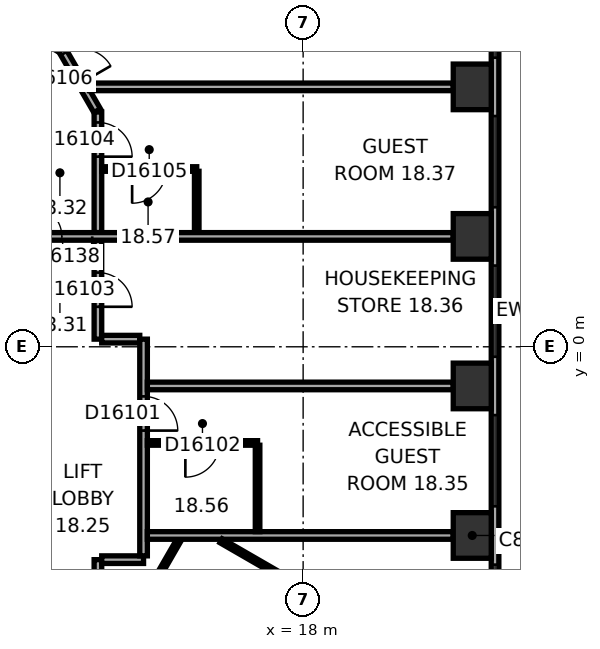
"""IFC4 building model, lengths in metres.
Left out: names, types, materials, properties, quantities, classifications, styles, units other than length and angle.
Written with IfcOpenShell. Run it as: python <this file> out.ifc"""

import sys

from ifc_helpers import new_model, si_unit, direction, frame, frame_2d, origin, origin_2d, place, context, subcontext, project, spatial, rectangle, extrude, element, fill, save


model = new_model("IFC4")
c1 = context("Model", 3, precision=1e-05, world=origin(), true_north=direction((0.0, 1.0)))
c2 = subcontext(c1, "Body", "Model", "MODEL_VIEW")
j1 = project(units=[si_unit("LENGTHUNIT", "METRE"), si_unit("PLANEANGLEUNIT", "RADIAN")], contexts=[c1])
p1 = place(None, origin())
s1 = spatial("IfcSite", under=j1, at=p1, CompositionType="ELEMENT")
p2 = place(p1, origin())
s2 = spatial("IfcBuilding", under=s1, at=p2, CompositionType="ELEMENT")
p3 = place(p2, frame((0.0, 0.0, 83.6)))
s3 = spatial("IfcBuildingStorey", under=s2, at=p3, CompositionType="ELEMENT", Elevation=83.6)
for number, where, z_axis, x_axis in (
    (1, (22.45, -4.965, 0.0), (0.0, 0.0, 1.0), (0.0, 1.0, 0.0)),
    (2, (22.45, -1.03, 0.0), (0.0, 0.0, 1.0), (0.0, 1.0, 0.0)),
    (3, (22.45, 2.905, 0.0), (0.0, 0.0, 1.0), (0.0, 1.0, 0.0)),
    (4, (22.45, 6.839, 0.0), (0.0, 0.0, 1.0), (0.0, 1.0, 0.0)),
):
    element("IfcColumn", number, at=place(p3, frame(where, z_axis=z_axis, x_axis=x_axis)), inside=s3, PredefinedType="COLUMN", context=c2, shape_type="SweptSolid", body=[
        extrude(rectangle(XDim=1.2, YDim=1.0, at=origin_2d()), origin(), (0.0, 0.0, 1.0), 3.3),
    ])
p4 = place(p3, frame((23.05, -9.687, 0.0), z_axis=(0.0, 0.0, 1.0), x_axis=(0.0, 1.0, 0.0)))
e5 = element("IfcWall", 5, at=p4, inside=s3, PredefinedType="STANDARD", context=c2, shape_type="SweptSolid", body=[
    extrude(rectangle(XDim=21.246, YDim=0.2, at=frame_2d((10.623, 0.0))), origin(), (0.0, 0.0, 1.0), 3.3),
])
p5 = place(p4, frame((1.555, 0.0, 0.8)))
e6 = element("IfcOpeningElement", 6, at=p5, cuts=e5, PredefinedType="OPENING", context=c2, shape_type="SweptSolid", body=[
    extrude(rectangle(XDim=2.4, YDim=1.7, at=frame_2d((1.2, 0.85))), frame((0.0, 0.11, 0.0), z_axis=(0.0, -1.0, 0.0), x_axis=(1.0, 0.0, 0.0)), (0.0, 0.0, 1.0), 0.22),
])
p6 = place(p4, frame((5.489, 0.0, 0.8)))
e7 = element("IfcOpeningElement", 7, at=p6, cuts=e5, PredefinedType="OPENING", context=c2, shape_type="SweptSolid", body=[
    extrude(rectangle(XDim=2.4, YDim=1.7, at=frame_2d((1.2, 0.85))), frame((0.0, 0.11, 0.0), z_axis=(0.0, -1.0, 0.0), x_axis=(1.0, 0.0, 0.0)), (0.0, 0.0, 1.0), 0.22),
])
p7 = place(p4, frame((9.424, 0.0, 0.8)))
e8 = element("IfcOpeningElement", 8, at=p7, cuts=e5, PredefinedType="OPENING", context=c2, shape_type="SweptSolid", body=[
    extrude(rectangle(XDim=2.4, YDim=1.7, at=frame_2d((1.2, 0.85))), frame((0.0, 0.11, 0.0), z_axis=(0.0, -1.0, 0.0), x_axis=(1.0, 0.0, 0.0)), (0.0, 0.0, 1.0), 0.22),
])
p8 = place(p4, frame((13.358, 0.0, 0.8)))
e9 = element("IfcOpeningElement", 9, at=p8, cuts=e5, PredefinedType="OPENING", context=c2, shape_type="SweptSolid", body=[
    extrude(rectangle(XDim=2.4, YDim=1.7, at=frame_2d((1.2, 0.85))), frame((0.0, 0.11, 0.0), z_axis=(0.0, -1.0, 0.0), x_axis=(1.0, 0.0, 0.0)), (0.0, 0.0, 1.0), 0.22),
])
p9 = place(p4, frame((17.293, 0.0, 0.8)))
e10 = element("IfcOpeningElement", 10, at=p9, cuts=e5, PredefinedType="OPENING", context=c2, shape_type="SweptSolid", body=[
    extrude(rectangle(XDim=2.4, YDim=1.7, at=frame_2d((1.2, 0.85))), frame((0.0, 0.11, 0.0), z_axis=(0.0, -1.0, 0.0), x_axis=(1.0, 0.0, 0.0)), (0.0, 0.0, 1.0), 0.22),
])
p10 = place(p3, frame((12.58, 6.212, 0.0), z_axis=(0.0, 0.0, 1.0), x_axis=(-0.500063286585, 0.865988862174, 0.0)))
e11 = element("IfcWall", 11, at=p10, inside=s3, PredefinedType="PARTITIONING", context=c2, shape_type="SweptSolid", body=[
    extrude(rectangle(XDim=1.86, YDim=0.2, at=frame_2d((0.93, 0.0))), origin(), (0.0, 0.0, 1.0), 3.05),
])
p11 = place(p10, frame((0.842, 0.0, 0.0)))
e12 = element("IfcOpeningElement", 12, at=p11, cuts=e11, PredefinedType="OPENING", context=c2, shape_type="SweptSolid", body=[
    extrude(rectangle(XDim=0.9, YDim=2.1, at=frame_2d((0.45, 1.05))), frame((0.0, 0.11, 0.0), z_axis=(0.0, -1.0, 0.0), x_axis=(1.0, 0.0, 0.0)), (0.0, 0.0, 1.0), 0.22),
])
p12 = place(p3, frame((12.6, -6.138, 0.0), z_axis=(0.0, 0.0, 1.0), x_axis=(0.0, 1.0, 0.0)))
e13 = element("IfcWall", 13, at=p12, inside=s3, PredefinedType="PARTITIONING", context=c2, shape_type="SweptSolid", body=[
    extrude(rectangle(XDim=0.537, YDim=0.2, at=frame_2d((0.268, 0.0))), origin(), (0.0, 0.0, 1.0), 3.05),
])
p13 = place(p3, frame((12.6, 0.201, 0.0), z_axis=(0.0, 0.0, 1.0), x_axis=(0.0, 1.0, 0.0)))
e14 = element("IfcWall", 14, at=p13, inside=s3, PredefinedType="PARTITIONING", context=c2, shape_type="SweptSolid", body=[
    extrude(rectangle(XDim=2.604, YDim=0.2, at=frame_2d((1.302, 0.0))), origin(), (0.0, 0.0, 1.0), 3.05),
])
p14 = place(p13, frame((0.852, 0.0, 0.0)))
e15 = element("IfcOpeningElement", 15, at=p14, cuts=e14, PredefinedType="OPENING", context=c2, shape_type="SweptSolid", body=[
    extrude(rectangle(XDim=0.9, YDim=2.1, at=frame_2d((0.45, 1.05))), frame((0.0, 0.11, 0.0), z_axis=(0.0, -1.0, 0.0), x_axis=(1.0, 0.0, 0.0)), (0.0, 0.0, 1.0), 0.22),
])
p15 = place(p3, frame((12.6, 3.004, 0.0), z_axis=(0.0, 0.0, 1.0), x_axis=(0.0, 1.0, 0.0)))
e16 = element("IfcWall", 16, at=p15, inside=s3, PredefinedType="PARTITIONING", context=c2, shape_type="SweptSolid", body=[
    extrude(rectangle(XDim=3.173, YDim=0.2, at=frame_2d((1.586, 0.0))), origin(), (0.0, 0.0, 1.0), 3.05),
])
p16 = place(p15, frame((1.998, 0.0, 0.0)))
e17 = element("IfcOpeningElement", 17, at=p16, cuts=e16, PredefinedType="OPENING", context=c2, shape_type="SweptSolid", body=[
    extrude(rectangle(XDim=0.9, YDim=2.1, at=frame_2d((0.45, 1.05))), frame((0.0, 0.11, 0.0), z_axis=(0.0, -1.0, 0.0), x_axis=(1.0, 0.0, 0.0)), (0.0, 0.0, 1.0), 0.22),
])
p17 = place(p3, frame((12.7, -5.601, 0.0), z_axis=(0.0, 0.0, 1.0), x_axis=(1.0, 0.0, 0.0)))
e18 = element("IfcWall", 18, at=p17, inside=s3, PredefinedType="PARTITIONING", context=c2, shape_type="SweptSolid", body=[
    extrude(rectangle(XDim=1.101, YDim=0.2, at=frame_2d((0.551, 0.0))), origin(), (0.0, 0.0, 1.0), 3.05),
])
p18 = place(p3, frame((12.7, 4.677, 0.0), z_axis=(0.0, 0.0, 1.0), x_axis=(1.0, 0.0, 0.0)))
e19 = element("IfcWall", 19, at=p18, inside=s3, PredefinedType="PARTITIONING", context=c2, shape_type="SweptSolid", body=[
    extrude(rectangle(XDim=2.5, YDim=0.12, at=frame_2d((1.25, 0.0))), origin(), (0.0, 0.0, 1.0), 3.05),
])
p19 = place(p18, frame((0.8, 0.0, 0.0)))
e20 = element("IfcOpeningElement", 20, at=p19, cuts=e19, PredefinedType="OPENING", context=c2, shape_type="SweptSolid", body=[
    extrude(rectangle(XDim=0.9, YDim=2.1, at=frame_2d((0.45, 1.05))), frame((0.0, 0.07, 0.0), z_axis=(0.0, -1.0, 0.0), x_axis=(1.0, 0.0, 0.0)), (0.0, 0.0, 1.0), 0.14),
])
p20 = place(p3, frame((13.701, 0.201, 0.0), z_axis=(0.0, 0.0, 1.0), x_axis=(-1.0, 0.0, 0.0)))
e21 = element("IfcWall", 21, at=p20, inside=s3, PredefinedType="PARTITIONING", context=c2, shape_type="SweptSolid", body=[
    extrude(rectangle(XDim=1.001, YDim=0.2, at=frame_2d((0.5, 0.0))), origin(), (0.0, 0.0, 1.0), 3.05),
])
p21 = place(p3, frame((13.801, -5.501, 0.0), z_axis=(0.0, 0.0, 1.0), x_axis=(0.0, 1.0, 0.0)))
e22 = element("IfcWall", 22, at=p21, inside=s3, PredefinedType="PARTITIONING", context=c2, shape_type="SweptSolid", body=[
    extrude(rectangle(XDim=5.702, YDim=0.2, at=frame_2d((2.851, 0.0))), origin(), (0.0, 0.0, 1.0), 3.05),
])
p22 = place(p21, frame((3.296, 0.0, 0.0)))
e23 = element("IfcOpeningElement", 23, at=p22, cuts=e22, PredefinedType="OPENING", context=c2, shape_type="SweptSolid", body=[
    extrude(rectangle(XDim=0.9, YDim=2.1, at=frame_2d((0.45, 1.05))), frame((0.0, 0.11, 0.0), z_axis=(0.0, -1.0, 0.0), x_axis=(1.0, 0.0, 0.0)), (0.0, 0.0, 1.0), 0.22),
])
p23 = place(p3, frame((13.901, -6.524, 0.0), z_axis=(0.0, 0.0, 1.0), x_axis=(0.499964162598, 0.86604609353, 0.0)))
e24 = element("IfcWall", 24, at=p23, inside=s3, PredefinedType="PARTITIONING", context=c2, shape_type="SweptSolid", body=[
    extrude(rectangle(XDim=1.661, YDim=0.12, at=frame_2d((0.831, 0.0))), origin(), (0.0, 0.0, 1.0), 3.05),
])
p24 = place(p3, frame((13.901, -4.965, 0.0), z_axis=(0.0, 0.0, 1.0), x_axis=(1.0, 0.0, 0.0)))
e25 = element("IfcWall", 25, at=p24, inside=s3, PredefinedType="PARTITIONING", context=c2, shape_type="SweptSolid", body=[
    extrude(rectangle(XDim=8.049, YDim=0.2, at=frame_2d((4.024, 0.0))), origin(), (0.0, 0.0, 1.0), 3.05),
])
p25 = place(p3, frame((13.901, -2.53, 0.0), z_axis=(0.0, 0.0, 1.0), x_axis=(1.0, 0.0, 0.0)))
e26 = element("IfcWall", 26, at=p25, inside=s3, PredefinedType="PARTITIONING", context=c2, shape_type="SweptSolid", body=[
    extrude(rectangle(XDim=2.9, YDim=0.12, at=frame_2d((1.45, 0.0))), origin(), (0.0, 0.0, 1.0), 3.05),
])
p26 = place(p25, frame((1.0, 0.0, 0.0)))
e27 = element("IfcOpeningElement", 27, at=p26, cuts=e26, PredefinedType="OPENING", context=c2, shape_type="SweptSolid", body=[
    extrude(rectangle(XDim=0.9, YDim=2.1, at=frame_2d((0.45, 1.05))), frame((0.0, 0.07, 0.0), z_axis=(0.0, -1.0, 0.0), x_axis=(1.0, 0.0, 0.0)), (0.0, 0.0, 1.0), 0.14),
])
p27 = place(p3, frame((15.2, 4.618, 0.0), z_axis=(0.0, 0.0, 1.0), x_axis=(0.0, -1.0, 0.0)))
e28 = element("IfcWall", 28, at=p27, inside=s3, PredefinedType="PARTITIONING", context=c2, shape_type="SweptSolid", body=[
    extrude(rectangle(XDim=1.613, YDim=0.12, at=frame_2d((0.807, 0.0))), origin(), (0.0, 0.0, 1.0), 3.05),
])
p28 = place(p3, frame((15.841, -5.104, 0.0), z_axis=(0.0, 0.0, 1.0), x_axis=(0.866025591402, -0.499999675036, 0.0)))
e29 = element("IfcWall", 29, at=p28, inside=s3, PredefinedType="PARTITIONING", context=c2, shape_type="SweptSolid", body=[
    extrude(rectangle(XDim=1.83, YDim=0.12, at=frame_2d((0.915, 0.0))), origin(), (0.0, 0.0, 1.0), 3.05),
])
p29 = place(p3, frame((16.801, -2.59, 0.0), z_axis=(0.0, 0.0, 1.0), x_axis=(0.0, -1.0, 0.0)))
e30 = element("IfcWall", 30, at=p29, inside=s3, PredefinedType="PARTITIONING", context=c2, shape_type="SweptSolid", body=[
    extrude(rectangle(XDim=2.274, YDim=0.12, at=frame_2d((1.137, 0.0))), origin(), (0.0, 0.0, 1.0), 3.05),
])
p30 = place(p3, frame((21.95, -1.03, 0.0), z_axis=(0.0, 0.0, 1.0), x_axis=(-1.0, 0.0, 0.0)))
e31 = element("IfcWall", 31, at=p30, inside=s3, PredefinedType="PARTITIONING", context=c2, shape_type="SweptSolid", body=[
    extrude(rectangle(XDim=8.049, YDim=0.2, at=frame_2d((4.024, 0.0))), origin(), (0.0, 0.0, 1.0), 2.6),
])
p31 = place(p3, frame((21.95, 2.905, 0.0), z_axis=(0.0, 0.0, 1.0), x_axis=(-1.0, 0.0, 0.0)))
e32 = element("IfcWall", 32, at=p31, inside=s3, PredefinedType="PARTITIONING", context=c2, shape_type="SweptSolid", body=[
    extrude(rectangle(XDim=11.25, YDim=0.2, at=frame_2d((5.625, 0.0))), origin(), (0.0, 0.0, 1.0), 3.05),
])
p32 = place(p31, frame((9.5, 0.0, 0.0)))
e33 = element("IfcOpeningElement", 33, at=p32, cuts=e32, PredefinedType="OPENING", context=c2, shape_type="SweptSolid", body=[
    extrude(rectangle(XDim=1.6, YDim=2.1, at=frame_2d((0.8, 1.05))), frame((0.0, 0.11, 0.0), z_axis=(0.0, -1.0, 0.0), x_axis=(1.0, 0.0, 0.0)), (0.0, 0.0, 1.0), 0.22),
])
p33 = place(p3, frame((21.95, 6.839, 0.0), z_axis=(0.0, 0.0, 1.0), x_axis=(-1.0, 0.0, 0.0)))
e34 = element("IfcWall", 34, at=p33, inside=s3, PredefinedType="PARTITIONING", context=c2, shape_type="SweptSolid", body=[
    extrude(rectangle(XDim=9.572, YDim=0.2, at=frame_2d((4.786, 0.0))), origin(), (0.0, 0.0, 1.0), 3.05),
])
p34 = place(p5, origin())
e35 = element("IfcWindow", 35, at=p34, inside=s3, PartitioningType="SINGLE_PANEL", PredefinedType="WINDOW", context=c2, shape_type="SweptSolid", body=[
    extrude(rectangle(XDim=2.4, YDim=1.7, at=frame_2d((1.2, 0.85))), frame((0.0, 0.03, 0.0), z_axis=(0.0, -1.0, 0.0), x_axis=(1.0, 0.0, 0.0)), (0.0, 0.0, 1.0), 0.06),
])
fill(e6, e35)
p35 = place(p6, origin())
e36 = element("IfcWindow", 36, at=p35, inside=s3, PartitioningType="SINGLE_PANEL", PredefinedType="WINDOW", context=c2, shape_type="SweptSolid", body=[
    extrude(rectangle(XDim=2.4, YDim=1.7, at=frame_2d((1.2, 0.85))), frame((0.0, 0.03, 0.0), z_axis=(0.0, -1.0, 0.0), x_axis=(1.0, 0.0, 0.0)), (0.0, 0.0, 1.0), 0.06),
])
fill(e7, e36)
p36 = place(p7, origin())
e37 = element("IfcWindow", 37, at=p36, inside=s3, PartitioningType="SINGLE_PANEL", PredefinedType="WINDOW", context=c2, shape_type="SweptSolid", body=[
    extrude(rectangle(XDim=2.4, YDim=1.7, at=frame_2d((1.2, 0.85))), frame((0.0, 0.03, 0.0), z_axis=(0.0, -1.0, 0.0), x_axis=(1.0, 0.0, 0.0)), (0.0, 0.0, 1.0), 0.06),
])
fill(e8, e37)
p37 = place(p8, origin())
e38 = element("IfcWindow", 38, at=p37, inside=s3, PartitioningType="SINGLE_PANEL", PredefinedType="WINDOW", context=c2, shape_type="SweptSolid", body=[
    extrude(rectangle(XDim=2.4, YDim=1.7, at=frame_2d((1.2, 0.85))), frame((0.0, 0.03, 0.0), z_axis=(0.0, -1.0, 0.0), x_axis=(1.0, 0.0, 0.0)), (0.0, 0.0, 1.0), 0.06),
])
fill(e9, e38)
p38 = place(p9, origin())
e39 = element("IfcWindow", 39, at=p38, inside=s3, PartitioningType="SINGLE_PANEL", PredefinedType="WINDOW", context=c2, shape_type="SweptSolid", body=[
    extrude(rectangle(XDim=2.4, YDim=1.7, at=frame_2d((1.2, 0.85))), frame((0.0, 0.03, 0.0), z_axis=(0.0, -1.0, 0.0), x_axis=(1.0, 0.0, 0.0)), (0.0, 0.0, 1.0), 0.06),
])
fill(e10, e39)
p39 = place(p22, origin())
e40 = element("IfcDoor", 40, at=p39, inside=s3, OperationType="SINGLE_SWING_LEFT", PredefinedType="DOOR", context=c2, shape_type="SweptSolid", body=[
    extrude(rectangle(XDim=0.9, YDim=2.1, at=frame_2d((0.45, 1.05))), frame((0.0, 0.025, 0.0), z_axis=(0.0, -1.0, 0.0), x_axis=(1.0, 0.0, 0.0)), (0.0, 0.0, 1.0), 0.05),
])
fill(e23, e40)
p40 = place(p26, origin())
e41 = element("IfcDoor", 41, at=p40, inside=s3, OperationType="SINGLE_SWING_LEFT", PredefinedType="DOOR", context=c2, shape_type="SweptSolid", body=[
    extrude(rectangle(XDim=0.9, YDim=2.1, at=frame_2d((0.45, 1.05))), frame((0.0, 0.025, 0.0), z_axis=(0.0, -1.0, 0.0), x_axis=(1.0, 0.0, 0.0)), (0.0, 0.0, 1.0), 0.05),
])
fill(e27, e41)
p41 = place(p14, origin())
e42 = element("IfcDoor", 42, at=p41, inside=s3, OperationType="SINGLE_SWING_LEFT", PredefinedType="DOOR", context=c2, shape_type="SweptSolid", body=[
    extrude(rectangle(XDim=0.9, YDim=2.1, at=frame_2d((0.45, 1.05))), frame((0.0, 0.025, 0.0), z_axis=(0.0, -1.0, 0.0), x_axis=(1.0, 0.0, 0.0)), (0.0, 0.0, 1.0), 0.05),
])
fill(e15, e42)
p42 = place(p16, origin())
e43 = element("IfcDoor", 43, at=p42, inside=s3, OperationType="SINGLE_SWING_LEFT", PredefinedType="DOOR", context=c2, shape_type="SweptSolid", body=[
    extrude(rectangle(XDim=0.9, YDim=2.1, at=frame_2d((0.45, 1.05))), frame((0.0, 0.025, 0.0), z_axis=(0.0, -1.0, 0.0), x_axis=(1.0, 0.0, 0.0)), (0.0, 0.0, 1.0), 0.05),
])
fill(e17, e43)
p43 = place(p19, origin())
e44 = element("IfcDoor", 44, at=p43, inside=s3, OperationType="SINGLE_SWING_LEFT", PredefinedType="DOOR", context=c2, shape_type="SweptSolid", body=[
    extrude(rectangle(XDim=0.9, YDim=2.1, at=frame_2d((0.45, 1.05))), frame((0.0, 0.025, 0.0), z_axis=(0.0, -1.0, 0.0), x_axis=(1.0, 0.0, 0.0)), (0.0, 0.0, 1.0), 0.05),
])
fill(e20, e44)
p44 = place(p11, origin())
e45 = element("IfcDoor", 45, at=p44, inside=s3, OperationType="SINGLE_SWING_LEFT", PredefinedType="DOOR", context=c2, shape_type="SweptSolid", body=[
    extrude(rectangle(XDim=0.9, YDim=2.1, at=frame_2d((0.45, 1.05))), frame((0.0, 0.025, 0.0), z_axis=(0.0, -1.0, 0.0), x_axis=(1.0, 0.0, 0.0)), (0.0, 0.0, 1.0), 0.05),
])
fill(e12, e45)
p45 = place(p32, origin())
e46 = element("IfcDoor", 46, at=p45, inside=s3, OperationType="DOUBLE_DOOR_SINGLE_SWING", PredefinedType="DOOR", context=c2, shape_type="SweptSolid", body=[
    extrude(rectangle(XDim=1.6, YDim=2.1, at=frame_2d((0.8, 1.05))), frame((0.0, 0.025, 0.0), z_axis=(0.0, -1.0, 0.0), x_axis=(1.0, 0.0, 0.0)), (0.0, 0.0, 1.0), 0.05),
])
fill(e33, e46)
save(model, sys.argv[1])
